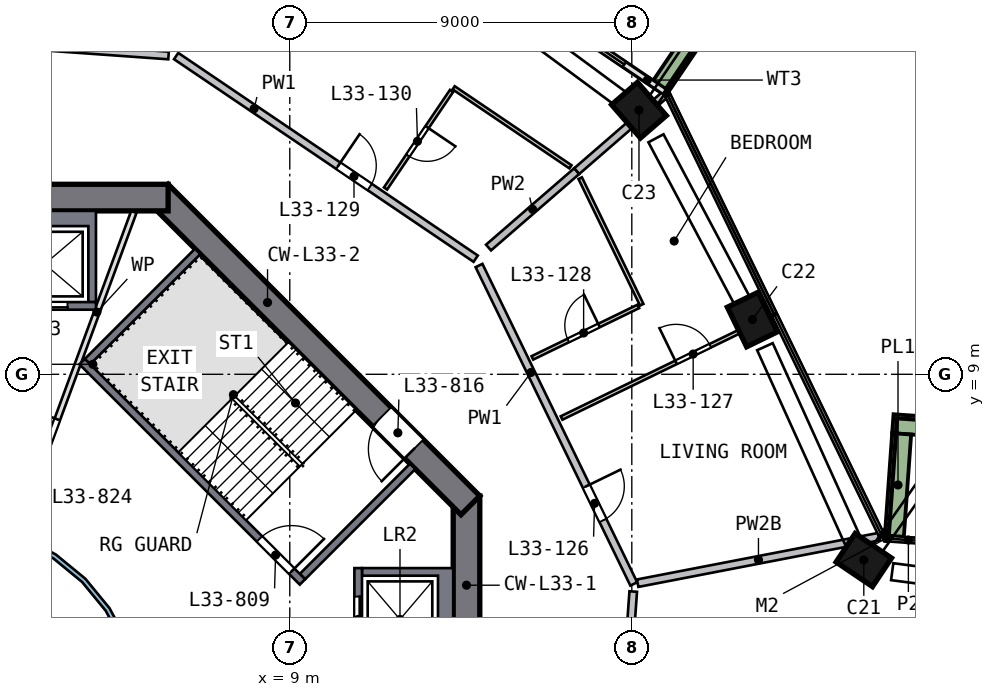
"""IFC4 building model, lengths in metres.
Left out: names, types, materials, properties, quantities, classifications, styles, units other than length and angle.
Written with IfcOpenShell. Run it as: python <this file> out.ifc"""

import sys

from ifc_helpers import new_model, si_unit, direction, frame, frame_2d, origin, origin_2d, place, context, subcontext, project, spatial, polyline, rectangle, outline, extrude, element, fill, save


model = new_model("IFC4")
c1 = context("Model", 3, precision=1e-05, world=origin(), true_north=direction((0.0, 1.0)))
c2 = subcontext(c1, "Body", "Model", "MODEL_VIEW")
j1 = project(units=[si_unit("LENGTHUNIT", "METRE"), si_unit("PLANEANGLEUNIT", "RADIAN")], contexts=[c1])
p1 = place(None, origin())
s1 = spatial("IfcSite", under=j1, at=p1, CompositionType="ELEMENT")
p2 = place(p1, origin())
s2 = spatial("IfcBuilding", under=s1, at=p2, CompositionType="ELEMENT")
p3 = place(p2, frame((0.0, 0.0, 140.0)))
s3 = spatial("IfcBuildingStorey", under=s2, at=p3, CompositionType="ELEMENT", Elevation=140.0)
p4 = place(p3, frame((24.129, 3.973, 0.0), z_axis=(-0.019916035, 0.114555209, 0.993217225), x_axis=(0.829659798, -0.552456015, 0.080355279)))
e1 = element("IfcColumn", 1, at=p4, inside=s3, PredefinedType="COLUMN", context=c2, shape_type="SweptSolid", body=[
    extrude(rectangle(XDim=1.15, YDim=0.9, at=origin_2d()), origin(), (0.0, 0.0, 1.0), 3.212),
])
p5 = place(p3, frame((21.233, 10.32, 0.0), z_axis=(-0.04988903, 0.100614614, 0.993673882), x_axis=(-0.433851601, 0.893958315, -0.11230013)))
e2 = element("IfcColumn", 2, at=p5, inside=s3, PredefinedType="COLUMN", context=c2, shape_type="SweptSolid", body=[
    extrude(rectangle(XDim=1.15, YDim=0.9, at=origin_2d()), origin(), (0.0, 0.0, 1.0), 3.21),
])
p6 = place(p3, frame((18.281, 15.846, 0.0), z_axis=(-0.076026707, 0.086290312, 0.993364949), x_axis=(0.650337538, -0.750890104, 0.115000597)))
e3 = element("IfcColumn", 3, at=p6, inside=s3, PredefinedType="COLUMN", context=c2, shape_type="SweptSolid", body=[
    extrude(rectangle(XDim=1.15, YDim=0.9, at=origin_2d()), origin(), (0.0, 0.0, 1.0), 3.211),
])
p7 = place(p3, frame((13.65, -5.799, 0.0), z_axis=(0.0, 0.0, 1.0), x_axis=(0.0, 1.0, 0.0)))
e4 = element("IfcWall", 4, at=p7, inside=s3, PredefinedType="SHEAR", context=c2, shape_type="SweptSolid", body=[
    extrude(rectangle(XDim=11.598, YDim=0.7, at=frame_2d((5.799, 0.0))), origin(), (0.0, 0.0, 1.0), 3.5),
])
p8 = place(p7, frame((4.899, 0.0, 0.0)))
e5 = element("IfcOpeningElement", 5, at=p8, cuts=e4, PredefinedType="OPENING", context=c2, shape_type="SweptSolid", body=[
    extrude(rectangle(XDim=1.8, YDim=2.1, at=frame_2d((0.9, 1.05))), frame((0.0, 0.36, 0.0), z_axis=(0.0, -1.0, 0.0), x_axis=(1.0, 0.0, 0.0)), (0.0, 0.0, 1.0), 0.72),
])
p9 = place(p3, frame((13.752, 5.552, 0.0), z_axis=(0.0, 0.0, 1.0), x_axis=(-0.707106781, 0.707106781, 0.0)))
e6 = element("IfcWall", 6, at=p9, inside=s3, PredefinedType="SHEAR", context=c2, shape_type="SweptSolid", body=[
    extrude(rectangle(XDim=11.598, YDim=0.7, at=frame_2d((5.799, 0.0))), origin(), (0.0, 0.0, 1.0), 3.5),
])
p10 = place(p9, frame((2.099, 0.0, 0.0)))
e7 = element("IfcOpeningElement", 7, at=p10, cuts=e6, PredefinedType="OPENING", context=c2, shape_type="SweptSolid", body=[
    extrude(rectangle(XDim=1.2, YDim=2.1, at=frame_2d((0.6, 1.05))), frame((0.0, 0.36, 0.0), z_axis=(0.0, -1.0, 0.0), x_axis=(1.0, 0.0, 0.0)), (0.0, 0.0, 1.0), 0.72),
])
p11 = place(p3, frame((5.799, 13.65, 0.0), z_axis=(0.0, 0.0, 1.0), x_axis=(-1.0, 0.0, 0.0)))
e8 = element("IfcWall", 8, at=p11, inside=s3, PredefinedType="SHEAR", context=c2, shape_type="SweptSolid", body=[
    extrude(rectangle(XDim=11.598, YDim=0.7, at=frame_2d((5.799, 0.0))), origin(), (0.0, 0.0, 1.0), 3.5),
])
p12 = place(p11, frame((4.899, 0.0, 0.0)))
e9 = element("IfcOpeningElement", 9, at=p12, cuts=e8, PredefinedType="OPENING", context=c2, shape_type="SweptSolid", body=[
    extrude(rectangle(XDim=1.8, YDim=2.1, at=frame_2d((0.9, 1.05))), frame((0.0, 0.36, 0.0), z_axis=(0.0, -1.0, 0.0), x_axis=(1.0, 0.0, 0.0)), (0.0, 0.0, 1.0), 0.72),
])
p13 = place(p3, frame((18.852, 16.444, 0.0), z_axis=(0.0, 0.0, 1.0), x_axis=(-0.828263751, 0.560338433, 0.0)))
e10 = element("IfcWall", 10, at=p13, inside=s3, PredefinedType="SOLIDWALL", context=c2, shape_type="SweptSolid", body=[
    extrude(rectangle(XDim=4.068, YDim=0.15, at=frame_2d((2.034, 0.0))), origin(), (0.0, 0.0, 1.0), 2.475),
])
p14 = place(p13, frame((1.268, 0.0, 0.0)))
e11 = element("IfcOpeningElement", 11, at=p14, cuts=e10, PredefinedType="OPENING", context=c2, shape_type="SweptSolid", body=[
    extrude(rectangle(XDim=2.4, YDim=2.4, at=frame_2d((1.2, 1.2))), frame((0.0, 0.085, 0.0), z_axis=(0.0, -1.0, 0.0), x_axis=(1.0, 0.0, 0.0)), (0.0, 0.0, 1.0), 0.17),
])
p15 = place(p3, frame((30.401, 7.305, 0.0), z_axis=(0.0, 0.0, 1.0), x_axis=(-0.997462944, 0.071187606, 0.0)))
e12 = element("IfcWall", 12, at=p15, inside=s3, PredefinedType="SOLIDWALL", context=c2, shape_type="SweptSolid", body=[
    extrude(rectangle(XDim=5.546, YDim=0.5, at=frame_2d((2.773, 0.0))), origin(), (0.0, 0.0, 1.0), 0.7),
])
p16 = place(p3, frame((25.101, 7.433, 0.0), z_axis=(0.0, 0.0, 1.0), x_axis=(-0.071189194, -0.997462831, 0.0)))
e13 = element("IfcWall", 13, at=p16, inside=s3, PredefinedType="SOLIDWALL", context=c2, shape_type="SweptSolid", body=[
    extrude(rectangle(XDim=2.699, YDim=0.5, at=frame_2d((1.35, 0.0))), origin(), (0.0, 0.0, 1.0), 0.7),
])
p17 = place(p3, frame((18.77, 16.591, 0.0), z_axis=(0.0, 0.0, 1.0), x_axis=(0.560411001, 0.828214652, 0.0)))
e14 = element("IfcWall", 14, at=p17, inside=s3, PredefinedType="SOLIDWALL", context=c2, shape_type="SweptSolid", body=[
    extrude(rectangle(XDim=3.199, YDim=0.5, at=frame_2d((1.6, 0.0))), origin(), (0.0, 0.0, 1.0), 0.7),
])
p18 = place(p3, origin())
e15 = element("IfcWall", 15, at=p18, inside=s3, PredefinedType="SOLIDWALL", context=c2, shape_type="SweptSolid", body=[
    extrude(outline(polyline([(13.3, 3.9), (13.3, 1.2), (10.9, 1.2), (10.9, 1.4), (12.9, 1.4), (12.9, 3.7), (10.9, 3.7), (10.9, 3.9), (13.3, 3.9)])), origin(), (0.0, 0.0, 1.0), 3.19),
])
p19 = place(p3, frame((10.8, 1.2, 0.0), z_axis=(0.0, 0.0, 1.0), x_axis=(0.0, 1.0, 0.0)))
e16 = element("IfcWall", 16, at=p19, inside=s3, PredefinedType="SOLIDWALL", context=c2, shape_type="SweptSolid", body=[
    extrude(rectangle(XDim=2.7, YDim=0.2, at=frame_2d((1.35, 0.0))), origin(), (0.0, 0.0, 1.0), 3.19),
])
p20 = place(p19, frame((0.75, 0.0, 0.0)))
e17 = element("IfcOpeningElement", 17, at=p20, cuts=e16, PredefinedType="OPENING", context=c2, shape_type="SweptSolid", body=[
    extrude(rectangle(XDim=1.2, YDim=2.1, at=frame_2d((0.6, 1.05))), frame((0.0, 0.11, 0.0), z_axis=(0.0, -1.0, 0.0), x_axis=(1.0, 0.0, 0.0)), (0.0, 0.0, 1.0), 0.22),
])
p21 = place(p3, origin())
e18 = element("IfcWall", 18, at=p21, inside=s3, PredefinedType="SOLIDWALL", context=c2, shape_type="SweptSolid", body=[
    extrude(outline(polyline([(3.9, 13.3), (3.9, 10.9), (3.7, 10.9), (3.7, 12.9), (1.4, 12.9), (1.4, 10.9), (1.2, 10.9), (1.2, 13.3), (3.9, 13.3)])), origin(), (0.0, 0.0, 1.0), 3.19),
])
p22 = place(p3, frame((1.2, 10.8, 0.0), z_axis=(0.0, 0.0, 1.0), x_axis=(1.0, 0.0, 0.0)))
e19 = element("IfcWall", 19, at=p22, inside=s3, PredefinedType="SOLIDWALL", context=c2, shape_type="SweptSolid", body=[
    extrude(rectangle(XDim=2.7, YDim=0.2, at=frame_2d((1.35, 0.0))), origin(), (0.0, 0.0, 1.0), 3.19),
])
p23 = place(p22, frame((0.75, 0.0, 0.0)))
e20 = element("IfcOpeningElement", 20, at=p23, cuts=e19, PredefinedType="OPENING", context=c2, shape_type="SweptSolid", body=[
    extrude(rectangle(XDim=1.2, YDim=2.1, at=frame_2d((0.6, 1.05))), frame((0.0, 0.11, 0.0), z_axis=(0.0, -1.0, 0.0), x_axis=(1.0, 0.0, 0.0)), (0.0, 0.0, 1.0), 0.22),
])
p24 = place(p3, frame((3.535, 9.334, 0.0), z_axis=(0.0, 0.0, 1.0), x_axis=(0.707106781, -0.707106781, 0.0)))
e21 = element("IfcWall", 21, at=p24, inside=s3, PredefinedType="SOLIDWALL", context=c2, shape_type="SweptSolid", body=[
    extrude(rectangle(XDim=8.2, YDim=0.2, at=frame_2d((4.1, 0.0))), origin(), (0.0, 0.0, 1.0), 3.19),
])
p25 = place(p24, frame((6.6, 0.0, 0.0)))
e22 = element("IfcOpeningElement", 22, at=p25, cuts=e21, PredefinedType="OPENING", context=c2, shape_type="SweptSolid", body=[
    extrude(rectangle(XDim=1.2, YDim=2.1, at=frame_2d((0.6, 1.05))), frame((0.0, 0.11, 0.0), z_axis=(0.0, -1.0, 0.0), x_axis=(1.0, 0.0, 0.0)), (0.0, 0.0, 1.0), 0.22),
])
for number, where, z_axis, x_axis in (
    (23, (9.334, 3.677, 0.0), (0.0, 0.0, 1.0), (0.707, 0.707, 0.0)),
    (24, (3.677, 9.334, 0.0), (0.0, 0.0, 1.0), (0.707, 0.707, 0.0)),
):
    element("IfcWall", number, at=place(p3, frame(where, z_axis=z_axis, x_axis=x_axis)), inside=s3, PredefinedType="SOLIDWALL", context=c2, shape_type="SweptSolid", body=[
        extrude(rectangle(XDim=4.1, YDim=0.2, at=frame_2d((2.05, 0.0))), origin(), (0.0, 0.0, 1.0), 3.19),
    ])
p26 = place(p3, frame((1.776, 4.813, 0.0), z_axis=(0.0, 0.0, 1.0), x_axis=(0.346109381, 0.938194168, 0.0)))
e25 = element("IfcWall", 25, at=p26, inside=s3, PredefinedType="PARTITIONING", context=c2, shape_type="SweptSolid", body=[
    extrude(rectangle(XDim=9.016, YDim=0.15, at=frame_2d((4.508, 0.0))), origin(), (0.0, 0.0, 1.0), 3.19),
])
p27 = place(p26, frame((1.4, 0.0, 0.0)))
e26 = element("IfcOpeningElement", 26, at=p27, cuts=e25, PredefinedType="OPENING", context=c2, shape_type="SweptSolid", body=[
    extrude(rectangle(XDim=1.8, YDim=2.1, at=frame_2d((0.9, 1.05))), frame((0.0, 0.085, 0.0), z_axis=(0.0, -1.0, 0.0), x_axis=(1.0, 0.0, 0.0)), (0.0, 0.0, 1.0), 0.17),
])
p28 = place(p3, origin())
e27 = element("IfcWall", 27, at=p28, inside=s3, PredefinedType="SOLIDWALL", context=c2, shape_type="SweptSolid", body=[
    extrude(outline(polyline([(5.021, -0.999), (4.73, -1.959), (4.257, -2.844), (3.62, -3.62), (2.844, -4.257), (1.959, -4.73), (0.999, -5.021), (0.0, -5.12), (-0.999, -5.021), (-1.959, -4.73), (-2.844, -4.257), (-3.62, -3.62), (-4.257, -2.844), (-4.73, -1.959), (-5.021, -0.999), (-5.12, 0.0), (-5.021, 0.999), (-4.73, 1.959), (-4.257, 2.844), (-3.62, 3.62), (-2.844, 4.257), (-1.959, 4.73), (-0.999, 5.021), (0.0, 5.12), (0.999, 5.021), (1.959, 4.73), (2.844, 4.257), (3.62, 3.62), (4.257, 2.844), (4.73, 1.959), (5.021, 0.999), (5.12, 0.0), (5.021, -0.999)]), holes=[polyline([(4.904, 0.976), (4.619, 1.913), (4.157, 2.778), (3.535, 3.535), (2.778, 4.157), (1.913, 4.619), (0.976, 4.904), (0.0, 5.0), (-0.976, 4.904), (-1.913, 4.619), (-2.778, 4.157), (-3.535, 3.535), (-4.157, 2.778), (-4.619, 1.913), (-4.904, 0.976), (-5.0, 0.0), (-4.904, -0.976), (-4.619, -1.913), (-4.157, -2.778), (-3.535, -3.535), (-2.778, -4.157), (-1.913, -4.619), (-0.976, -4.904), (0.0, -5.0), (0.976, -4.904), (1.913, -4.619), (2.778, -4.157), (3.535, -3.535), (4.157, -2.778), (4.619, -1.913), (4.904, -0.976), (5.0, 0.0), (4.904, 0.976)])]), origin(), (0.0, 0.0, 1.0), 3.19),
])
p29 = place(p3, frame((-3.483, 18.052, 0.0), z_axis=(0.0, 0.0, 1.0), x_axis=(0.997463885, -0.071174419, 0.0)))
e28 = element("IfcWall", 28, at=p29, inside=s3, PredefinedType="SOLIDWALL", context=c2, shape_type="SweptSolid", body=[
    extrude(rectangle(XDim=9.316, YDim=0.2, at=frame_2d((4.658, 0.0))), origin(), (0.0, 0.0, 1.0), 3.19),
])
p30 = place(p29, frame((0.55, 0.0, 0.0)))
e29 = element("IfcOpeningElement", 29, at=p30, cuts=e28, PredefinedType="OPENING", context=c2, shape_type="SweptSolid", body=[
    extrude(rectangle(XDim=1.0, YDim=2.1, at=frame_2d((0.5, 1.05))), frame((0.0, 0.11, 0.0), z_axis=(0.0, -1.0, 0.0), x_axis=(1.0, 0.0, 0.0)), (0.0, 0.0, 1.0), 0.22),
])
p31 = place(p3, frame((6.01, 17.375, 0.0), z_axis=(0.0, 0.0, 1.0), x_axis=(0.828249794, -0.560359063, 0.0)))
e30 = element("IfcWall", 30, at=p31, inside=s3, PredefinedType="SOLIDWALL", context=c2, shape_type="SweptSolid", body=[
    extrude(rectangle(XDim=9.516, YDim=0.2, at=frame_2d((4.758, 0.0))), origin(), (0.0, 0.0, 1.0), 3.19),
])
p32 = place(p31, frame((5.15, 0.0, 0.0)))
e31 = element("IfcOpeningElement", 31, at=p32, cuts=e30, PredefinedType="OPENING", context=c2, shape_type="SweptSolid", body=[
    extrude(rectangle(XDim=1.0, YDim=2.1, at=frame_2d((0.5, 1.05))), frame((0.0, 0.11, 0.0), z_axis=(0.0, -1.0, 0.0), x_axis=(1.0, 0.0, 0.0)), (0.0, 0.0, 1.0), 0.22),
])
p33 = place(p3, frame((13.979, 11.862, 0.0), z_axis=(0.0, 0.0, 1.0), x_axis=(0.437122641, -0.899401911, 0.0)))
e32 = element("IfcWall", 32, at=p33, inside=s3, PredefinedType="SOLIDWALL", context=c2, shape_type="SweptSolid", body=[
    extrude(rectangle(XDim=9.317, YDim=0.2, at=frame_2d((4.658, 0.0))), origin(), (0.0, 0.0, 1.0), 3.19),
])
p34 = place(p33, frame((6.458, 0.0, 0.0)))
e33 = element("IfcOpeningElement", 33, at=p34, cuts=e32, PredefinedType="OPENING", context=c2, shape_type="SweptSolid", body=[
    extrude(rectangle(XDim=1.0, YDim=2.1, at=frame_2d((0.5, 1.05))), frame((0.0, 0.11, 0.0), z_axis=(0.0, -1.0, 0.0), x_axis=(1.0, 0.0, 0.0)), (0.0, 0.0, 1.0), 0.22),
])
p35 = place(p3, frame((17.806, 0.033, 0.0), z_axis=(0.0, 0.0, 1.0), x_axis=(0.0711086, 0.997468579, 0.0)))
e34 = element("IfcWall", 34, at=p35, inside=s3, PredefinedType="SOLIDWALL", context=c2, shape_type="SweptSolid", body=[
    extrude(rectangle(XDim=3.258, YDim=0.2, at=frame_2d((1.629, 0.0))), origin(), (0.0, 0.0, 1.0), 3.19),
])
p36 = place(p3, frame((14.23, 12.335, 0.0), z_axis=(0.0, 0.0, 1.0), x_axis=(0.75561043, 0.655021281, 0.0)))
e35 = element("IfcWall", 35, at=p36, inside=s3, PredefinedType="SOLIDWALL", context=c2, shape_type="SweptSolid", body=[
    extrude(rectangle(XDim=3.073, YDim=0.2, at=frame_2d((1.536, 0.0))), origin(), (0.0, 0.0, 1.0), 3.19),
])
p37 = place(p3, frame((16.552, 14.348, 0.0), z_axis=(0.0, 0.0, 1.0), x_axis=(0.75562852, 0.655000411, 0.0)))
e36 = element("IfcWall", 36, at=p37, inside=s3, PredefinedType="SOLIDWALL", context=c2, shape_type="SweptSolid", body=[
    extrude(rectangle(XDim=3.059, YDim=0.2, at=frame_2d((1.53, 0.0))), origin(), (0.0, 0.0, 1.0), 3.19),
])
p38 = place(p3, frame((18.154, 3.502, 0.0), z_axis=(0.0, 0.0, 1.0), x_axis=(0.981897644, 0.189412293, 0.0)))
e37 = element("IfcWall", 37, at=p38, inside=s3, PredefinedType="SOLIDWALL", context=c2, shape_type="SweptSolid", body=[
    extrude(rectangle(XDim=6.476, YDim=0.2, at=frame_2d((3.238, 0.0))), origin(), (0.0, 0.0, 1.0), 2.69),
])
p39 = place(p3, frame((13.256, 16.456, 0.0), z_axis=(0.0, 0.0, 1.0), x_axis=(-0.560376113, -0.828238258, 0.0)))
e38 = element("IfcWall", 38, at=p39, inside=s3, PredefinedType="PARTITIONING", context=c2, shape_type="SweptSolid", body=[
    extrude(rectangle(XDim=3.1, YDim=0.1, at=frame_2d((1.55, 0.0))), origin(), (0.0, 0.0, 1.0), 3.19),
])
p40 = place(p39, frame((1.15, 0.0, 0.0)))
e39 = element("IfcOpeningElement", 39, at=p40, cuts=e38, PredefinedType="OPENING", context=c2, shape_type="SweptSolid", body=[
    extrude(rectangle(XDim=0.9, YDim=2.1, at=frame_2d((0.45, 1.05))), frame((0.0, 0.06, 0.0), z_axis=(0.0, -1.0, 0.0), x_axis=(1.0, 0.0, 0.0)), (0.0, 0.0, 1.0), 0.12),
])
p41 = place(p3, frame((13.312, 16.539, 0.0), z_axis=(0.0, 0.0, 1.0), x_axis=(0.828225037, -0.560395652, 0.0)))
e40 = element("IfcWall", 40, at=p41, inside=s3, PredefinedType="PARTITIONING", context=c2, shape_type="SweptSolid", body=[
    extrude(rectangle(XDim=3.711, YDim=0.1, at=frame_2d((1.855, 0.0))), origin(), (0.0, 0.0, 1.0), 3.19),
])
p42 = place(p3, frame((15.383, 9.431, 0.0), z_axis=(0.0, 0.0, 1.0), x_axis=(0.89941086, 0.437104227, 0.0)))
e41 = element("IfcWall", 41, at=p42, inside=s3, PredefinedType="PARTITIONING", context=c2, shape_type="SweptSolid", body=[
    extrude(rectangle(XDim=3.1, YDim=0.1, at=frame_2d((1.55, 0.0))), origin(), (0.0, 0.0, 1.0), 3.19),
])
p43 = place(p42, frame((1.05, 0.0, 0.0)))
e42 = element("IfcOpeningElement", 42, at=p43, cuts=e41, PredefinedType="OPENING", context=c2, shape_type="SweptSolid", body=[
    extrude(rectangle(XDim=0.9, YDim=2.1, at=frame_2d((0.45, 1.05))), frame((0.0, 0.06, 0.0), z_axis=(0.0, -1.0, 0.0), x_axis=(1.0, 0.0, 0.0)), (0.0, 0.0, 1.0), 0.12),
])
p44 = place(p3, frame((18.261, 10.83, 0.0), z_axis=(0.0, 0.0, 1.0), x_axis=(-0.437060899, 0.899431915, 0.0)))
e43 = element("IfcWall", 43, at=p44, inside=s3, PredefinedType="PARTITIONING", context=c2, shape_type="SweptSolid", body=[
    extrude(rectangle(XDim=3.704, YDim=0.1, at=frame_2d((1.852, 0.0))), origin(), (0.0, 0.0, 1.0), 3.19),
])
p45 = place(p3, frame((16.152, 7.85, 0.0), z_axis=(0.0, 0.0, 1.0), x_axis=(0.899404273, 0.437117781, 0.0)))
e44 = element("IfcWall", 44, at=p45, inside=s3, PredefinedType="PARTITIONING", context=c2, shape_type="SweptSolid", body=[
    extrude(rectangle(XDim=6.15, YDim=0.1, at=frame_2d((3.075, 0.0))), origin(), (0.0, 0.0, 1.0), 3.19),
])
p46 = place(p45, frame((3.35, 0.0, 0.0)))
e45 = element("IfcOpeningElement", 45, at=p46, cuts=e44, PredefinedType="OPENING", context=c2, shape_type="SweptSolid", body=[
    extrude(rectangle(XDim=1.0, YDim=2.1, at=frame_2d((0.5, 1.05))), frame((0.0, 0.06, 0.0), z_axis=(0.0, -1.0, 0.0), x_axis=(1.0, 0.0, 0.0)), (0.0, 0.0, 1.0), 0.12),
])
p47 = place(p14, origin())
e46 = element("IfcDoor", 46, at=p47, inside=s3, OperationType="SLIDING_TO_LEFT", PredefinedType="DOOR", context=c2, shape_type="SweptSolid", body=[
    extrude(rectangle(XDim=2.4, YDim=2.4, at=frame_2d((1.2, 1.2))), frame((0.0, 0.025, 0.0), z_axis=(0.0, -1.0, 0.0), x_axis=(1.0, 0.0, 0.0)), (0.0, 0.0, 1.0), 0.05),
])
fill(e11, e46)
p48 = place(p20, origin())
e47 = element("IfcDoor", 47, at=p48, inside=s3, OperationType="DOUBLE_DOOR_SLIDING", PredefinedType="DOOR", context=c2, shape_type="SweptSolid", body=[
    extrude(rectangle(XDim=1.2, YDim=2.1, at=frame_2d((0.6, 1.05))), frame((0.0, 0.025, 0.0), z_axis=(0.0, -1.0, 0.0), x_axis=(1.0, 0.0, 0.0)), (0.0, 0.0, 1.0), 0.05),
])
fill(e17, e47)
p49 = place(p23, origin())
e48 = element("IfcDoor", 48, at=p49, inside=s3, OperationType="DOUBLE_DOOR_SLIDING", PredefinedType="DOOR", context=c2, shape_type="SweptSolid", body=[
    extrude(rectangle(XDim=1.2, YDim=2.1, at=frame_2d((0.6, 1.05))), frame((0.0, 0.025, 0.0), z_axis=(0.0, -1.0, 0.0), x_axis=(1.0, 0.0, 0.0)), (0.0, 0.0, 1.0), 0.05),
])
fill(e20, e48)
p50 = place(p25, origin())
e49 = element("IfcDoor", 49, at=p50, inside=s3, OperationType="SINGLE_SWING_RIGHT", PredefinedType="DOOR", context=c2, shape_type="SweptSolid", body=[
    extrude(rectangle(XDim=1.2, YDim=2.1, at=frame_2d((0.6, 1.05))), frame((0.0, 0.025, 0.0), z_axis=(0.0, -1.0, 0.0), x_axis=(1.0, 0.0, 0.0)), (0.0, 0.0, 1.0), 0.05),
])
fill(e22, e49)
p51 = place(p10, origin())
e50 = element("IfcDoor", 50, at=p51, inside=s3, OperationType="SINGLE_SWING_LEFT", PredefinedType="DOOR", context=c2, shape_type="SweptSolid", body=[
    extrude(rectangle(XDim=1.2, YDim=2.1, at=frame_2d((0.6, 1.05))), frame((0.0, 0.025, 0.0), z_axis=(0.0, -1.0, 0.0), x_axis=(1.0, 0.0, 0.0)), (0.0, 0.0, 1.0), 0.05),
])
fill(e7, e50)
p52 = place(p27, origin())
e51 = element("IfcDoor", 51, at=p52, inside=s3, OperationType="DOUBLE_DOOR_SINGLE_SWING", PredefinedType="DOOR", context=c2, shape_type="SweptSolid", body=[
    extrude(rectangle(XDim=1.8, YDim=2.1, at=frame_2d((0.9, 1.05))), frame((0.0, 0.025, 0.0), z_axis=(0.0, -1.0, 0.0), x_axis=(1.0, 0.0, 0.0)), (0.0, 0.0, 1.0), 0.05),
])
fill(e26, e51)
p53 = place(p34, origin())
e52 = element("IfcDoor", 52, at=p53, inside=s3, OperationType="SINGLE_SWING_LEFT", PredefinedType="DOOR", context=c2, shape_type="SweptSolid", body=[
    extrude(rectangle(XDim=1.0, YDim=2.1, at=frame_2d((0.5, 1.05))), frame((0.0, 0.025, 0.0), z_axis=(0.0, -1.0, 0.0), x_axis=(1.0, 0.0, 0.0)), (0.0, 0.0, 1.0), 0.05),
])
fill(e33, e52)
p54 = place(p46, origin())
e53 = element("IfcDoor", 53, at=p54, inside=s3, OperationType="SINGLE_SWING_LEFT", PredefinedType="DOOR", context=c2, shape_type="SweptSolid", body=[
    extrude(rectangle(XDim=1.0, YDim=2.1, at=frame_2d((0.5, 1.05))), frame((0.0, 0.025, 0.0), z_axis=(0.0, -1.0, 0.0), x_axis=(1.0, 0.0, 0.0)), (0.0, 0.0, 1.0), 0.05),
])
fill(e45, e53)
p55 = place(p43, origin())
e54 = element("IfcDoor", 54, at=p55, inside=s3, OperationType="SINGLE_SWING_RIGHT", PredefinedType="DOOR", context=c2, shape_type="SweptSolid", body=[
    extrude(rectangle(XDim=0.9, YDim=2.1, at=frame_2d((0.45, 1.05))), frame((0.0, 0.025, 0.0), z_axis=(0.0, -1.0, 0.0), x_axis=(1.0, 0.0, 0.0)), (0.0, 0.0, 1.0), 0.05),
])
fill(e42, e54)
p56 = place(p32, origin())
e55 = element("IfcDoor", 55, at=p56, inside=s3, OperationType="SINGLE_SWING_LEFT", PredefinedType="DOOR", context=c2, shape_type="SweptSolid", body=[
    extrude(rectangle(XDim=1.0, YDim=2.1, at=frame_2d((0.5, 1.05))), frame((0.0, 0.025, 0.0), z_axis=(0.0, -1.0, 0.0), x_axis=(1.0, 0.0, 0.0)), (0.0, 0.0, 1.0), 0.05),
])
fill(e31, e55)
p57 = place(p40, origin())
e56 = element("IfcDoor", 56, at=p57, inside=s3, OperationType="SINGLE_SWING_LEFT", PredefinedType="DOOR", context=c2, shape_type="SweptSolid", body=[
    extrude(rectangle(XDim=0.9, YDim=2.1, at=frame_2d((0.45, 1.05))), frame((0.0, 0.025, 0.0), z_axis=(0.0, -1.0, 0.0), x_axis=(1.0, 0.0, 0.0)), (0.0, 0.0, 1.0), 0.05),
])
fill(e39, e56)
save(model, sys.argv[1])
